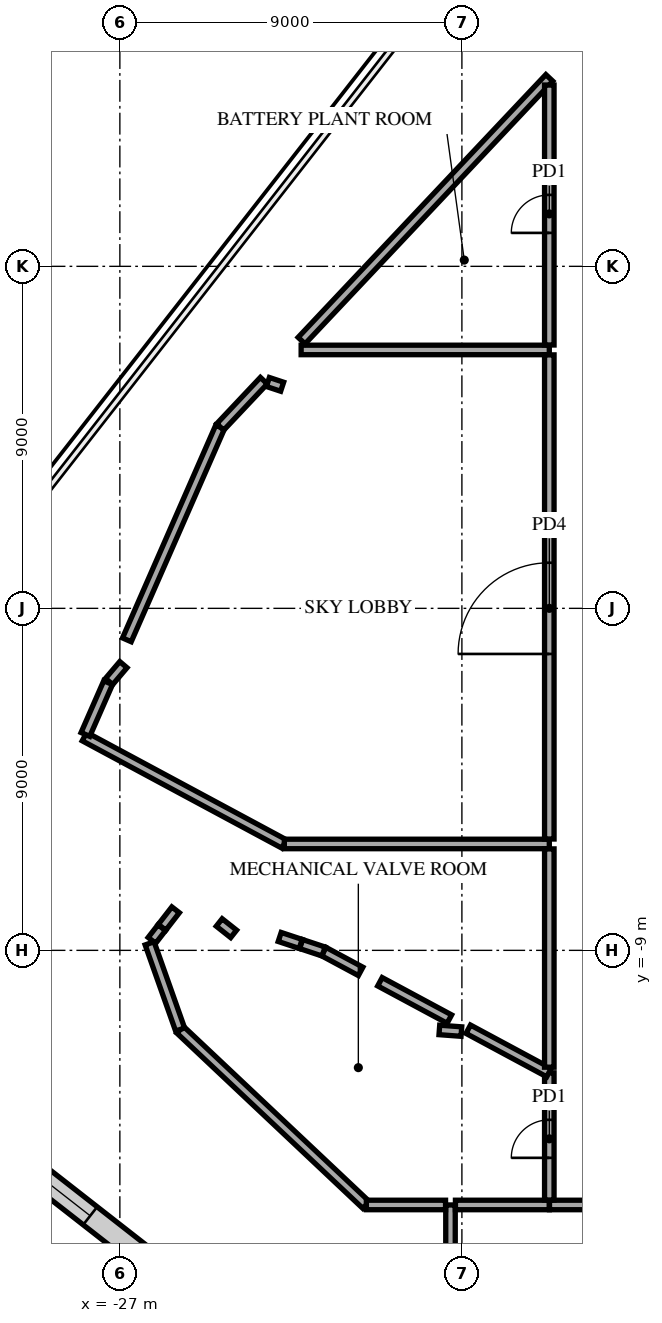
"""IFC4 building model, lengths in metres.
Left out: names, types, materials, properties, quantities, classifications, styles, units other than length and angle.
Written with IfcOpenShell. Run it as: python <this file> out.ifc"""

import sys

from ifc_helpers import new_model, si_unit, direction, frame, frame_2d, origin, place, context, subcontext, project, spatial, rectangle, extrude, element, fill, save


model = new_model("IFC4")
c1 = context("Model", 3, precision=1e-05, world=origin(), true_north=direction((0.0, 1.0)))
c2 = subcontext(c1, "Body", "Model", "MODEL_VIEW")
j1 = project(units=[si_unit("LENGTHUNIT", "METRE"), si_unit("PLANEANGLEUNIT", "RADIAN")], contexts=[c1])
p1 = place(None, origin())
s1 = spatial("IfcSite", under=j1, at=p1, CompositionType="ELEMENT")
p2 = place(p1, origin())
s2 = spatial("IfcBuilding", under=s1, at=p2, CompositionType="ELEMENT")
p3 = place(p2, frame((0.0, 0.0, 237.3)))
s3 = spatial("IfcBuildingStorey", under=s2, at=p3, CompositionType="ELEMENT", Elevation=237.3)
p4 = place(p3, frame((-18.3, -17.793, 0.0), z_axis=(0.0, 0.0, 1.0), x_axis=(0.0, 1.0, 0.0)))
e1 = element("IfcWall", 1, at=p4, inside=s3, PredefinedType="PARTITIONING", context=c2, shape_type="SweptSolid", body=[
    extrude(rectangle(XDim=2.093, YDim=0.25, at=frame_2d((1.046, 0.0))), origin(), (0.0, 0.0, 1.0), 4.72),
])
p5 = place(p3, frame((-25.413, -11.088, 0.0), z_axis=(0.0, 0.0, 1.0), x_axis=(0.727678472321, -0.685918392318, 0.0)))
e2 = element("IfcWall", 2, at=p5, inside=s3, PredefinedType="PARTITIONING", context=c2, shape_type="SweptSolid", body=[
    extrude(rectangle(XDim=6.723, YDim=0.25, at=frame_2d((3.362, 0.0))), origin(), (0.0, 0.0, 1.0), 4.72),
])
p6 = place(p3, frame((-20.514, -15.7, 0.0), z_axis=(0.0, 0.0, 1.0), x_axis=(1.0, 0.0, 0.0)))
e3 = element("IfcWall", 3, at=p6, inside=s3, PredefinedType="PARTITIONING", context=c2, shape_type="SweptSolid", body=[
    extrude(rectangle(XDim=2.084, YDim=0.25, at=frame_2d((1.042, 0.0))), origin(), (0.0, 0.0, 1.0), 4.72),
])
p7 = place(p3, frame((-18.17, -15.7, 0.0), z_axis=(0.0, 0.0, 1.0), x_axis=(1.0, 0.0, 0.0)))
e4 = element("IfcWall", 4, at=p7, inside=s3, PredefinedType="PARTITIONING", context=c2, shape_type="SweptSolid", body=[
    extrude(rectangle(XDim=2.47, YDim=0.25, at=frame_2d((1.235, 0.0))), origin(), (0.0, 0.0, 1.0), 4.72),
])
p8 = place(p3, frame((-15.695, -15.7, 0.0), z_axis=(0.0, 0.0, 1.0), x_axis=(1.0, 0.0, 0.0)))
e5 = element("IfcWall", 5, at=p8, inside=s3, PredefinedType="PARTITIONING", context=c2, shape_type="SweptSolid", body=[
    extrude(rectangle(XDim=3.716, YDim=0.25, at=frame_2d((1.858, 0.0))), origin(), (0.0, 0.0, 1.0), 4.72),
])
p9 = place(p8, frame((1.257, 0.0, 0.0)))
e6 = element("IfcOpeningElement", 6, at=p9, cuts=e5, PredefinedType="OPENING", context=c2, shape_type="SweptSolid", body=[
    extrude(rectangle(XDim=1.2, YDim=2.1, at=frame_2d((0.6, 1.05))), frame((0.0, 0.135, 0.0), z_axis=(0.0, -1.0, 0.0), x_axis=(1.0, 0.0, 0.0)), (0.0, 0.0, 1.0), 0.27),
])
p10 = place(p3, frame((-15.7, -15.57, 0.0), z_axis=(0.0, 0.0, 1.0), x_axis=(0.0, 1.0, 0.0)))
e7 = element("IfcWall", 7, at=p10, inside=s3, PredefinedType="PARTITIONING", context=c2, shape_type="SweptSolid", body=[
    extrude(rectangle(XDim=3.348, YDim=0.25, at=frame_2d((1.674, 0.0))), origin(), (0.0, 0.0, 1.0), 4.72),
])
p11 = place(p10, frame((1.11, 0.0, 0.0)))
e8 = element("IfcOpeningElement", 8, at=p11, cuts=e7, PredefinedType="OPENING", context=c2, shape_type="SweptSolid", body=[
    extrude(rectangle(XDim=1.0, YDim=2.1, at=frame_2d((0.5, 1.05))), frame((0.0, 0.135, 0.0), z_axis=(0.0, -1.0, 0.0), x_axis=(1.0, 0.0, 0.0)), (0.0, 0.0, 1.0), 0.27),
])
p12 = place(p3, frame((-18.593, -11.094, 0.0), z_axis=(0.0, 0.0, 1.0), x_axis=(0.997234429152, -0.074320207983, 0.0)))
e9 = element("IfcWall", 9, at=p12, inside=s3, PredefinedType="PARTITIONING", context=c2, shape_type="SweptSolid", body=[
    extrude(rectangle(XDim=0.582, YDim=0.25, at=frame_2d((0.291, 0.0))), origin(), (0.0, 0.0, 1.0), 5.24),
])
p13 = place(p3, frame((-26.217, -8.815, 0.0), z_axis=(0.0, 0.0, 1.0), x_axis=(0.333409345275, -0.942782163855, 0.0)))
e10 = element("IfcWall", 10, at=p13, inside=s3, PredefinedType="PARTITIONING", context=c2, shape_type="SweptSolid", body=[
    extrude(rectangle(XDim=2.406, YDim=0.25, at=frame_2d((1.203, 0.0))), origin(), (0.0, 0.0, 1.0), 4.42),
])
p14 = place(p3, frame((-17.833, -11.076, 0.0), z_axis=(0.0, 0.0, 1.0), x_axis=(0.880812256997, -0.473465698783, 0.0)))
e11 = element("IfcWall", 11, at=p14, inside=s3, PredefinedType="PARTITIONING", context=c2, shape_type="SweptSolid", body=[
    extrude(rectangle(XDim=2.411, YDim=0.25, at=frame_2d((1.206, 0.0))), origin(), (0.0, 0.0, 1.0), 4.42),
])
p15 = place(p3, frame((-20.156, -9.826, 0.0), z_axis=(0.0, 0.0, 1.0), x_axis=(0.880780830304, -0.473524158802, 0.0)))
e12 = element("IfcWall", 12, at=p15, inside=s3, PredefinedType="PARTITIONING", context=c2, shape_type="SweptSolid", body=[
    extrude(rectangle(XDim=2.074, YDim=0.25, at=frame_2d((1.037, 0.0))), origin(), (0.0, 0.0, 1.0), 4.72),
])
p16 = place(p3, frame((-21.634, -9.032, 0.0), z_axis=(0.0, 0.0, 1.0), x_axis=(0.880812831363, -0.473464630259, 0.0)))
e13 = element("IfcWall", 13, at=p16, inside=s3, PredefinedType="PARTITIONING", context=c2, shape_type="SweptSolid", body=[
    extrude(rectangle(XDim=1.1, YDim=0.25, at=frame_2d((0.55, 0.0))), origin(), (0.0, 0.0, 1.0), 5.24),
])
p17 = place(p3, frame((-22.229, -8.835, 0.0), z_axis=(0.0, 0.0, 1.0), x_axis=(0.949192171176, -0.314697032362, 0.0)))
e14 = element("IfcWall", 14, at=p17, inside=s3, PredefinedType="PARTITIONING", context=c2, shape_type="SweptSolid", body=[
    extrude(rectangle(XDim=0.622, YDim=0.25, at=frame_2d((0.311, 0.0))), origin(), (0.0, 0.0, 1.0), 5.24),
])
p18 = place(p3, frame((-26.156, -8.737, 0.0), z_axis=(0.0, 0.0, 1.0), x_axis=(0.61261688372, 0.790380005934, 0.0)))
e15 = element("IfcWall", 15, at=p18, inside=s3, PredefinedType="PARTITIONING", context=c2, shape_type="SweptSolid", body=[
    extrude(rectangle(XDim=0.422, YDim=0.25, at=frame_2d((0.211, 0.0))), origin(), (0.0, 0.0, 1.0), 5.24),
])
p19 = place(p3, frame((-22.794, -8.648, 0.0), z_axis=(0.0, 0.0, 1.0), x_axis=(0.949269442188, -0.314463870942, 0.0)))
e16 = element("IfcWall", 16, at=p19, inside=s3, PredefinedType="PARTITIONING", context=c2, shape_type="SweptSolid", body=[
    extrude(rectangle(XDim=0.582, YDim=0.25, at=frame_2d((0.291, 0.0))), origin(), (0.0, 0.0, 1.0), 5.24),
])
p20 = place(p3, frame((-25.889, -8.393, 0.0), z_axis=(0.0, 0.0, 1.0), x_axis=(0.612689720082, 0.790323545712, 0.0)))
e17 = element("IfcWall", 17, at=p20, inside=s3, PredefinedType="PARTITIONING", context=c2, shape_type="SweptSolid", body=[
    extrude(rectangle(XDim=0.581, YDim=0.25, at=frame_2d((0.291, 0.0))), origin(), (0.0, 0.0, 1.0), 5.24),
])
p21 = place(p3, frame((-24.385, -8.266, 0.0), z_axis=(0.0, 0.0, 1.0), x_axis=(0.783912744573, -0.620871008258, 0.0)))
e18 = element("IfcWall", 18, at=p21, inside=s3, PredefinedType="PARTITIONING", context=c2, shape_type="SweptSolid", body=[
    extrude(rectangle(XDim=0.484, YDim=0.25, at=frame_2d((0.242, 0.0))), origin(), (0.0, 0.0, 1.0), 5.24),
])
p22 = place(p3, frame((-27.931, -3.376, 0.0), z_axis=(0.0, 0.0, 1.0), x_axis=(0.880770617751, -0.473543154218, 0.0)))
e19 = element("IfcWall", 19, at=p22, inside=s3, PredefinedType="PARTITIONING", context=c2, shape_type="SweptSolid", body=[
    extrude(rectangle(XDim=5.964, YDim=0.25, at=frame_2d((2.982, 0.0))), origin(), (0.0, 0.0, 1.0), 4.406),
])
p23 = place(p3, frame((-22.672, -6.2, 0.0), z_axis=(0.0, 0.0, 1.0), x_axis=(1.0, 0.0, 0.0)))
e20 = element("IfcWall", 20, at=p23, inside=s3, PredefinedType="PARTITIONING", context=c2, shape_type="SweptSolid", body=[
    extrude(rectangle(XDim=6.972, YDim=0.25, at=frame_2d((3.486, 0.0))), origin(), (0.0, 0.0, 1.0), 5.24),
])
p24 = place(p3, frame((-15.7, -12.075, 0.0), z_axis=(0.0, 0.0, 1.0), x_axis=(0.0, 1.0, 0.0)))
e21 = element("IfcWall", 21, at=p24, inside=s3, PredefinedType="PARTITIONING", context=c2, shape_type="SweptSolid", body=[
    extrude(rectangle(XDim=5.745, YDim=0.25, at=frame_2d((2.872, 0.0))), origin(), (0.0, 0.0, 1.0), 4.72),
])
p25 = place(p3, frame((-27.906, -3.319, 0.0), z_axis=(0.0, 0.0, 1.0), x_axis=(0.401154480985, 0.91601041609, 0.0)))
e22 = element("IfcWall", 22, at=p25, inside=s3, PredefinedType="PARTITIONING", context=c2, shape_type="SweptSolid", body=[
    extrude(rectangle(XDim=1.488, YDim=0.25, at=frame_2d((0.744, 0.0))), origin(), (0.0, 0.0, 1.0), 5.24),
])
p26 = place(p3, frame((-27.283, -1.925, 0.0), z_axis=(0.0, 0.0, 1.0), x_axis=(0.647014435149, 0.76247775096, 0.0)))
e23 = element("IfcWall", 23, at=p26, inside=s3, PredefinedType="PARTITIONING", context=c2, shape_type="SweptSolid", body=[
    extrude(rectangle(XDim=0.582, YDim=0.25, at=frame_2d((0.291, 0.0))), origin(), (0.0, 0.0, 1.0), 5.24),
])
p27 = place(p3, frame((-26.815, -0.829, 0.0), z_axis=(0.0, 0.0, 1.0), x_axis=(0.401206498636, 0.915987633897, 0.0)))
e24 = element("IfcWall", 24, at=p27, inside=s3, PredefinedType="PARTITIONING", context=c2, shape_type="SweptSolid", body=[
    extrude(rectangle(XDim=6.111, YDim=0.25, at=frame_2d((3.056, 0.0))), origin(), (0.0, 0.0, 1.0), 5.24),
])
p28 = place(p3, frame((-24.36, 4.773, 0.0), z_axis=(0.0, 0.0, 1.0), x_axis=(0.685873917807, 0.727720391959, 0.0)))
e25 = element("IfcWall", 25, at=p28, inside=s3, PredefinedType="PARTITIONING", context=c2, shape_type="SweptSolid", body=[
    extrude(rectangle(XDim=1.674, YDim=0.25, at=frame_2d((0.837, 0.0))), origin(), (0.0, 0.0, 1.0), 5.24),
])
p29 = place(p3, frame((-23.105, 5.956, 0.0), z_axis=(0.0, 0.0, 1.0), x_axis=(0.949360107339, -0.314190048528, 0.0)))
e26 = element("IfcWall", 26, at=p29, inside=s3, PredefinedType="PARTITIONING", context=c2, shape_type="SweptSolid", body=[
    extrude(rectangle(XDim=0.396, YDim=0.25, at=frame_2d((0.198, 0.0))), origin(), (0.0, 0.0, 1.0), 5.24),
])
p30 = place(p3, frame((-22.23, 6.8, 0.0), z_axis=(0.0, 0.0, 1.0), x_axis=(1.0, 0.0, 0.0)))
e27 = element("IfcWall", 27, at=p30, inside=s3, PredefinedType="PARTITIONING", context=c2, shape_type="SweptSolid", body=[
    extrude(rectangle(XDim=6.53, YDim=0.25, at=frame_2d((3.265, 0.0))), origin(), (0.0, 0.0, 1.0), 4.406),
])
p31 = place(p3, frame((-15.7, -6.07, 0.0), z_axis=(0.0, 0.0, 1.0), x_axis=(0.0, 1.0, 0.0)))
e28 = element("IfcWall", 28, at=p31, inside=s3, PredefinedType="PARTITIONING", context=c2, shape_type="SweptSolid", body=[
    extrude(rectangle(XDim=12.74, YDim=0.25, at=frame_2d((6.37, 0.0))), origin(), (0.0, 0.0, 1.0), 4.72),
])
p32 = place(p31, frame((4.87, 0.0, 0.0)))
e29 = element("IfcOpeningElement", 29, at=p32, cuts=e28, PredefinedType="OPENING", context=c2, shape_type="SweptSolid", body=[
    extrude(rectangle(XDim=2.4, YDim=2.4, at=frame_2d((1.2, 1.2))), frame((0.0, 0.135, 0.0), z_axis=(0.0, -1.0, 0.0), x_axis=(1.0, 0.0, 0.0)), (0.0, 0.0, 1.0), 0.27),
])
p33 = place(p3, frame((-22.218, 7.045, 0.0), z_axis=(0.0, 0.0, 1.0), x_axis=(0.685910269878, 0.727686128544, 0.0)))
e30 = element("IfcWall", 30, at=p33, inside=s3, PredefinedType="PARTITIONING", context=c2, shape_type="SweptSolid", body=[
    extrude(rectangle(XDim=9.502, YDim=0.25, at=frame_2d((4.751, 0.0))), origin(), (0.0, 0.0, 1.0), 4.406),
])
p34 = place(p3, frame((-15.7, 6.93, 0.0), z_axis=(0.0, 0.0, 1.0), x_axis=(0.0, 1.0, 0.0)))
e31 = element("IfcWall", 31, at=p34, inside=s3, PredefinedType="PARTITIONING", context=c2, shape_type="SweptSolid", body=[
    extrude(rectangle(XDim=6.841, YDim=0.25, at=frame_2d((3.42, 0.0))), origin(), (0.0, 0.0, 1.0), 4.72),
])
p35 = place(p34, frame((2.95, 0.0, 0.0)))
e32 = element("IfcOpeningElement", 32, at=p35, cuts=e31, PredefinedType="OPENING", context=c2, shape_type="SweptSolid", body=[
    extrude(rectangle(XDim=1.0, YDim=2.1, at=frame_2d((0.5, 1.05))), frame((0.0, 0.135, 0.0), z_axis=(0.0, -1.0, 0.0), x_axis=(1.0, 0.0, 0.0)), (0.0, 0.0, 1.0), 0.27),
])
p36 = place(p3, frame((-33.651, -11.398, 0.0), z_axis=(0.0, 0.0, 1.0), x_axis=(0.788011466291, -0.61566056313, 0.0)))
e33 = element("IfcWall", 33, at=p36, inside=s3, PredefinedType="STANDARD", context=c2, shape_type="SweptSolid", body=[
    extrude(rectangle(XDim=39.0, YDim=0.6, at=frame_2d((19.5, 0.0))), origin(), (0.0, 0.0, 1.0), 5.24),
])
p37 = place(p36, frame((1.217, 0.0, 0.6)))
e34 = element("IfcOpeningElement", 34, at=p37, cuts=e33, PredefinedType="OPENING", context=c2, shape_type="SweptSolid", body=[
    extrude(rectangle(XDim=1.9, YDim=4.19, at=frame_2d((0.95, 2.095))), frame((0.0, 0.31, 0.0), z_axis=(0.0, -1.0, 0.0), x_axis=(1.0, 0.0, 0.0)), (0.0, 0.0, 1.0), 0.62),
])
p38 = place(p36, frame((5.55, 0.0, 0.6)))
e35 = element("IfcOpeningElement", 35, at=p38, cuts=e33, PredefinedType="OPENING", context=c2, shape_type="SweptSolid", body=[
    extrude(rectangle(XDim=1.9, YDim=4.19, at=frame_2d((0.95, 2.095))), frame((0.0, 0.31, 0.0), z_axis=(0.0, -1.0, 0.0), x_axis=(1.0, 0.0, 0.0)), (0.0, 0.0, 1.0), 0.62),
])
p39 = place(p36, frame((18.55, 0.0, 0.6)))
e36 = element("IfcOpeningElement", 36, at=p39, cuts=e33, PredefinedType="OPENING", context=c2, shape_type="SweptSolid", body=[
    extrude(rectangle(XDim=1.9, YDim=4.19, at=frame_2d((0.95, 2.095))), frame((0.0, 0.31, 0.0), z_axis=(0.0, -1.0, 0.0), x_axis=(1.0, 0.0, 0.0)), (0.0, 0.0, 1.0), 0.62),
])
p40 = place(p36, frame((22.883, 0.0, 0.6)))
e37 = element("IfcOpeningElement", 37, at=p40, cuts=e33, PredefinedType="OPENING", context=c2, shape_type="SweptSolid", body=[
    extrude(rectangle(XDim=1.9, YDim=4.19, at=frame_2d((0.95, 2.095))), frame((0.0, 0.31, 0.0), z_axis=(0.0, -1.0, 0.0), x_axis=(1.0, 0.0, 0.0)), (0.0, 0.0, 1.0), 0.62),
])
p41 = place(p36, frame((31.55, 0.0, 0.6)))
e38 = element("IfcOpeningElement", 38, at=p41, cuts=e33, PredefinedType="OPENING", context=c2, shape_type="SweptSolid", body=[
    extrude(rectangle(XDim=1.9, YDim=4.19, at=frame_2d((0.95, 2.095))), frame((0.0, 0.31, 0.0), z_axis=(0.0, -1.0, 0.0), x_axis=(1.0, 0.0, 0.0)), (0.0, 0.0, 1.0), 0.62),
])
p42 = place(p36, frame((35.883, 0.0, 0.6)))
e39 = element("IfcOpeningElement", 39, at=p42, cuts=e33, PredefinedType="OPENING", context=c2, shape_type="SweptSolid", body=[
    extrude(rectangle(XDim=1.9, YDim=4.19, at=frame_2d((0.95, 2.095))), frame((0.0, 0.31, 0.0), z_axis=(0.0, -1.0, 0.0), x_axis=(1.0, 0.0, 0.0)), (0.0, 0.0, 1.0), 0.62),
])
p43 = place(p11, origin())
e40 = element("IfcDoor", 40, at=p43, inside=s3, OperationType="SINGLE_SWING_LEFT", PredefinedType="DOOR", context=c2, shape_type="SweptSolid", body=[
    extrude(rectangle(XDim=1.0, YDim=2.1, at=frame_2d((0.5, 1.05))), frame((0.0, 0.025, 0.0), z_axis=(0.0, -1.0, 0.0), x_axis=(1.0, 0.0, 0.0)), (0.0, 0.0, 1.0), 0.05),
])
fill(e8, e40)
p44 = place(p32, origin())
e41 = element("IfcDoor", 41, at=p44, inside=s3, OperationType="SINGLE_SWING_LEFT", PredefinedType="DOOR", context=c2, shape_type="SweptSolid", body=[
    extrude(rectangle(XDim=2.4, YDim=2.4, at=frame_2d((1.2, 1.2))), frame((0.0, 0.025, 0.0), z_axis=(0.0, -1.0, 0.0), x_axis=(1.0, 0.0, 0.0)), (0.0, 0.0, 1.0), 0.05),
])
fill(e29, e41)
p45 = place(p35, origin())
e42 = element("IfcDoor", 42, at=p45, inside=s3, OperationType="SINGLE_SWING_LEFT", PredefinedType="DOOR", context=c2, shape_type="SweptSolid", body=[
    extrude(rectangle(XDim=1.0, YDim=2.1, at=frame_2d((0.5, 1.05))), frame((0.0, 0.025, 0.0), z_axis=(0.0, -1.0, 0.0), x_axis=(1.0, 0.0, 0.0)), (0.0, 0.0, 1.0), 0.05),
])
fill(e32, e42)
p46 = place(p38, origin())
e43 = element("IfcWindow", 43, at=p46, inside=s3, PartitioningType="SINGLE_PANEL", PredefinedType="USERDEFINED", context=c2, shape_type="SweptSolid", body=[
    extrude(rectangle(XDim=1.9, YDim=4.19, at=frame_2d((0.95, 2.095))), frame((0.0, 0.03, 0.0), z_axis=(0.0, -1.0, 0.0), x_axis=(1.0, 0.0, 0.0)), (0.0, 0.0, 1.0), 0.06),
])
fill(e35, e43)
save(model, sys.argv[1])
